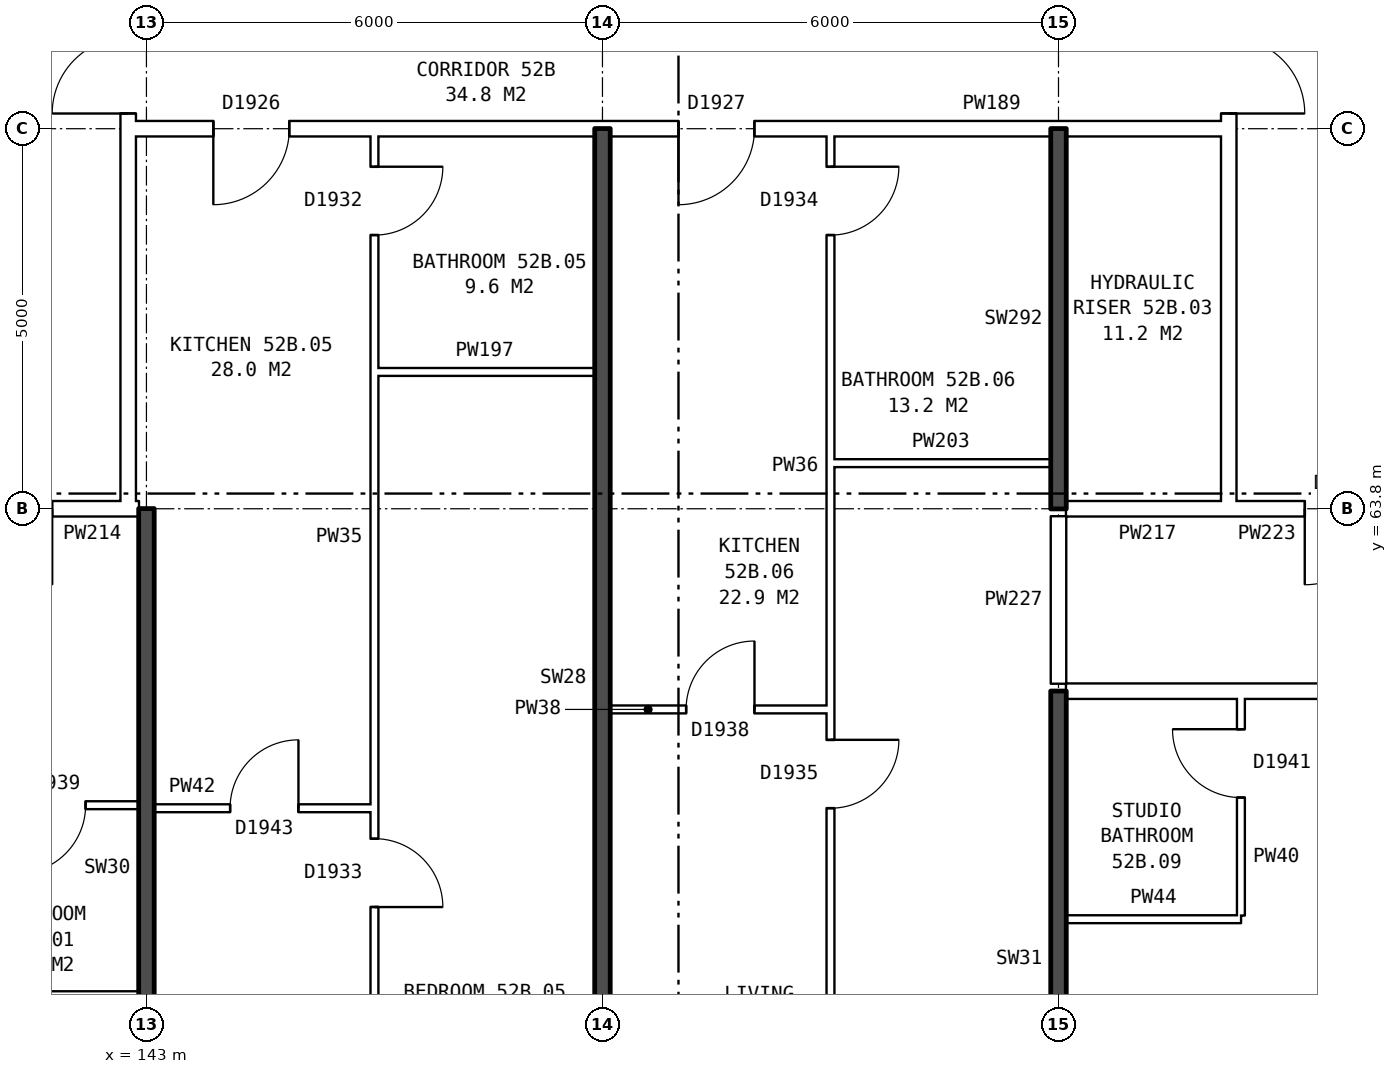
"""IFC4 building model, lengths in metres.
Left out: names, types, materials, properties, quantities, classifications, styles, units other than length and angle.
Written with IfcOpenShell. Run it as: python <this file> out.ifc"""

import sys

from ifc_helpers import new_model, si_unit, direction, frame, frame_2d, origin, place, context, subcontext, project, spatial, rectangle, extrude, element, fill, save


model = new_model("IFC4")
c1 = context("Model", 3, precision=1e-05, world=origin(), true_north=direction((0.0, 1.0)))
c2 = subcontext(c1, "Body", "Model", "MODEL_VIEW")
j1 = project(units=[si_unit("LENGTHUNIT", "METRE"), si_unit("PLANEANGLEUNIT", "RADIAN")], contexts=[c1])
p1 = place(None, origin())
s1 = spatial("IfcSite", under=j1, at=p1, CompositionType="ELEMENT")
p2 = place(p1, origin())
s2 = spatial("IfcBuilding", under=s1, at=p2, CompositionType="ELEMENT")
p3 = place(p2, frame((0.0, 0.0, 185.1)))
s3 = spatial("IfcBuildingStorey", under=s2, at=p3, CompositionType="ELEMENT", Elevation=185.1)
p4 = place(p3, frame((142.76, 63.9, 0.0), z_axis=(0.0, 0.0, 1.0), x_axis=(0.0, 1.0, 0.0)))
e1 = element("IfcWall", 1, at=p4, inside=s3, PredefinedType="PARTITIONING", context=c2, shape_type="SweptSolid", body=[
    extrude(rectangle(XDim=12.2, YDim=0.2, at=frame_2d((6.1, 0.0))), origin(), (0.0, 0.0, 1.0), 2.85),
])
p5 = place(p4, frame((5.1, 0.0, 0.0)))
e2 = element("IfcOpeningElement", 2, at=p5, cuts=e1, PredefinedType="OPENING", context=c2, shape_type="SweptSolid", body=[
    extrude(rectangle(XDim=2.0, YDim=2.1, at=frame_2d((1.0, 1.05))), frame((0.0, 0.11, 0.0), z_axis=(0.0, -1.0, 0.0), x_axis=(1.0, 0.0, 0.0)), (0.0, 0.0, 1.0), 0.22),
])
p6 = place(p3, frame((157.24, 63.9, 0.0), z_axis=(0.0, 0.0, 1.0), x_axis=(0.0, 1.0, 0.0)))
e3 = element("IfcWall", 3, at=p6, inside=s3, PredefinedType="PARTITIONING", context=c2, shape_type="SweptSolid", body=[
    extrude(rectangle(XDim=12.2, YDim=0.2, at=frame_2d((6.1, 0.0))), origin(), (0.0, 0.0, 1.0), 2.85),
])
p7 = place(p6, frame((5.1, 0.0, 0.0)))
e4 = element("IfcOpeningElement", 4, at=p7, cuts=e3, PredefinedType="OPENING", context=c2, shape_type="SweptSolid", body=[
    extrude(rectangle(XDim=2.0, YDim=2.1, at=frame_2d((1.0, 1.05))), frame((0.0, 0.11, 0.0), z_axis=(0.0, -1.0, 0.0), x_axis=(1.0, 0.0, 0.0)), (0.0, 0.0, 1.0), 0.22),
])
for number, where, z_axis, x_axis in (
    (5, (140.6, 57.4, 0.0), (0.0, 0.0, 1.0), (1.0, 0.0, 0.0)),
    (6, (155.1, 58.4, 0.0), (0.0, 0.0, 1.0), (1.0, 0.0, 0.0)),
):
    element("IfcWall", number, at=place(p3, frame(where, z_axis=z_axis, x_axis=x_axis)), inside=s3, PredefinedType="PARTITIONING", context=c2, shape_type="SweptSolid", body=[
        extrude(rectangle(XDim=2.3, YDim=0.1, at=frame_2d((1.15, 0.0))), origin(), (0.0, 0.0, 1.0), 2.85),
    ])
p8 = place(p3, frame((143.1, 59.86, 0.0), z_axis=(0.0, 0.0, 1.0), x_axis=(1.0, 0.0, 0.0)))
e7 = element("IfcWall", 7, at=p8, inside=s3, PredefinedType="PARTITIONING", context=c2, shape_type="SweptSolid", body=[
    extrude(rectangle(XDim=2.9, YDim=0.1, at=frame_2d((1.45, 0.0))), origin(), (0.0, 0.0, 1.0), 2.85),
])
p9 = place(p8, frame((1.0, 0.0, 0.0)))
e8 = element("IfcOpeningElement", 8, at=p9, cuts=e7, PredefinedType="OPENING", context=c2, shape_type="SweptSolid", body=[
    extrude(rectangle(XDim=0.9, YDim=2.1, at=frame_2d((0.45, 1.05))), frame((0.0, 0.06, 0.0), z_axis=(0.0, -1.0, 0.0), x_axis=(1.0, 0.0, 0.0)), (0.0, 0.0, 1.0), 0.12),
])
p10 = place(p3, frame((137.1, 59.9, 0.0), z_axis=(0.0, 0.0, 1.0), x_axis=(1.0, 0.0, 0.0)))
e9 = element("IfcWall", 9, at=p10, inside=s3, PredefinedType="PARTITIONING", context=c2, shape_type="SweptSolid", body=[
    extrude(rectangle(XDim=5.8, YDim=0.1, at=frame_2d((2.9, 0.0))), origin(), (0.0, 0.0, 1.0), 2.85),
])
p11 = place(p10, frame((1.3, 0.0, 0.0)))
e10 = element("IfcOpeningElement", 10, at=p11, cuts=e9, PredefinedType="OPENING", context=c2, shape_type="SweptSolid", body=[
    extrude(rectangle(XDim=0.9, YDim=2.1, at=frame_2d((0.45, 1.05))), frame((0.0, 0.06, 0.0), z_axis=(0.0, -1.0, 0.0), x_axis=(1.0, 0.0, 0.0)), (0.0, 0.0, 1.0), 0.12),
])
p12 = place(p10, frame((4.2, 0.0, 0.0)))
e11 = element("IfcOpeningElement", 11, at=p12, cuts=e9, PredefinedType="OPENING", context=c2, shape_type="SweptSolid", body=[
    extrude(rectangle(XDim=0.9, YDim=2.1, at=frame_2d((0.45, 1.05))), frame((0.0, 0.06, 0.0), z_axis=(0.0, -1.0, 0.0), x_axis=(1.0, 0.0, 0.0)), (0.0, 0.0, 1.0), 0.12),
])
p13 = place(p3, frame((149.1, 61.16, 0.0), z_axis=(0.0, 0.0, 1.0), x_axis=(1.0, 0.0, 0.0)))
e12 = element("IfcWall", 12, at=p13, inside=s3, PredefinedType="PARTITIONING", context=c2, shape_type="SweptSolid", body=[
    extrude(rectangle(XDim=2.9, YDim=0.1, at=frame_2d((1.45, 0.0))), origin(), (0.0, 0.0, 1.0), 2.85),
])
p14 = place(p13, frame((1.0, 0.0, 0.0)))
e13 = element("IfcOpeningElement", 13, at=p14, cuts=e12, PredefinedType="OPENING", context=c2, shape_type="SweptSolid", body=[
    extrude(rectangle(XDim=0.9, YDim=2.1, at=frame_2d((0.45, 1.05))), frame((0.0, 0.06, 0.0), z_axis=(0.0, -1.0, 0.0), x_axis=(1.0, 0.0, 0.0)), (0.0, 0.0, 1.0), 0.12),
])
p15 = place(p3, frame((155.1, 61.4, 0.0), z_axis=(0.0, 0.0, 1.0), x_axis=(1.0, 0.0, 0.0)))
e14 = element("IfcWall", 14, at=p15, inside=s3, PredefinedType="PARTITIONING", context=c2, shape_type="SweptSolid", body=[
    extrude(rectangle(XDim=14.79, YDim=0.2, at=frame_2d((7.395, 0.0))), origin(), (0.0, 0.0, 1.0), 2.85),
])
p16 = place(p15, frame((3.6, 0.0, 0.0)))
e15 = element("IfcOpeningElement", 15, at=p16, cuts=e14, PredefinedType="OPENING", context=c2, shape_type="SweptSolid", body=[
    extrude(rectangle(XDim=1.0, YDim=2.1, at=frame_2d((0.5, 1.05))), frame((0.0, 0.11, 0.0), z_axis=(0.0, -1.0, 0.0), x_axis=(1.0, 0.0, 0.0)), (0.0, 0.0, 1.0), 0.22),
])
p17 = place(p15, frame((11.045, 0.0, 0.0)))
e16 = element("IfcOpeningElement", 16, at=p17, cuts=e14, PredefinedType="OPENING", context=c2, shape_type="SweptSolid", body=[
    extrude(rectangle(XDim=1.0, YDim=2.1, at=frame_2d((0.5, 1.05))), frame((0.0, 0.11, 0.0), z_axis=(0.0, -1.0, 0.0), x_axis=(1.0, 0.0, 0.0)), (0.0, 0.0, 1.0), 0.22),
])
p18 = place(p3, frame((139.76, 63.8, 0.0), z_axis=(0.0, 0.0, 1.0), x_axis=(1.0, 0.0, 0.0)))
e17 = element("IfcWall", 17, at=p18, inside=s3, PredefinedType="PARTITIONING", context=c2, shape_type="SweptSolid", body=[
    extrude(rectangle(XDim=3.0, YDim=0.2, at=frame_2d((1.5, 0.0))), origin(), (0.0, 0.0, 1.0), 2.85),
])
p19 = place(p18, frame((1.0, 0.0, 0.0)))
e18 = element("IfcOpeningElement", 18, at=p19, cuts=e17, PredefinedType="OPENING", context=c2, shape_type="SweptSolid", body=[
    extrude(rectangle(XDim=1.0, YDim=2.1, at=frame_2d((0.5, 1.05))), frame((0.0, 0.11, 0.0), z_axis=(0.0, -1.0, 0.0), x_axis=(1.0, 0.0, 0.0)), (0.0, 0.0, 1.0), 0.22),
])
p20 = place(p3, frame((142.76, 63.8, 0.0), z_axis=(0.0, 0.0, 1.0), x_axis=(1.0, 0.0, 0.0)))
e19 = element("IfcWall", 19, at=p20, inside=s3, PredefinedType="PARTITIONING", context=c2, shape_type="SweptSolid", body=[
    extrude(rectangle(XDim=0.14, YDim=0.2, at=frame_2d((0.07, 0.0))), origin(), (0.0, 0.0, 1.0), 2.85),
])
p21 = place(p3, frame((155.1, 63.8, 0.0), z_axis=(0.0, 0.0, 1.0), x_axis=(1.0, 0.0, 0.0)))
e20 = element("IfcWall", 20, at=p21, inside=s3, PredefinedType="PARTITIONING", context=c2, shape_type="SweptSolid", body=[
    extrude(rectangle(XDim=2.14, YDim=0.2, at=frame_2d((1.07, 0.0))), origin(), (0.0, 0.0, 1.0), 2.85),
])
p22 = place(p3, frame((157.24, 63.8, 0.0), z_axis=(0.0, 0.0, 1.0), x_axis=(1.0, 0.0, 0.0)))
e21 = element("IfcWall", 21, at=p22, inside=s3, PredefinedType="PARTITIONING", context=c2, shape_type="SweptSolid", body=[
    extrude(rectangle(XDim=3.0, YDim=0.2, at=frame_2d((1.5, 0.0))), origin(), (0.0, 0.0, 1.0), 2.85),
])
p23 = place(p22, frame((1.0, 0.0, 0.0)))
e22 = element("IfcOpeningElement", 22, at=p23, cuts=e21, PredefinedType="OPENING", context=c2, shape_type="SweptSolid", body=[
    extrude(rectangle(XDim=1.0, YDim=2.1, at=frame_2d((0.5, 1.05))), frame((0.0, 0.11, 0.0), z_axis=(0.0, -1.0, 0.0), x_axis=(1.0, 0.0, 0.0)), (0.0, 0.0, 1.0), 0.22),
])
for number, where, z_axis, x_axis in (
    (23, (152.0, 64.4, 0.0), (0.0, 0.0, 1.0), (1.0, 0.0, 0.0)),
    (24, (146.0, 65.6, 0.0), (0.0, 0.0, 1.0), (1.0, 0.0, 0.0)),
):
    element("IfcWall", number, at=place(p3, frame(where, z_axis=z_axis, x_axis=x_axis)), inside=s3, PredefinedType="PARTITIONING", context=c2, shape_type="SweptSolid", body=[
        extrude(rectangle(XDim=2.9, YDim=0.1, at=frame_2d((1.45, 0.0))), origin(), (0.0, 0.0, 1.0), 2.85),
    ])
p24 = place(p3, frame((142.76, 68.8, 0.0), z_axis=(0.0, 0.0, 1.0), x_axis=(1.0, 0.0, 0.0)))
e25 = element("IfcWall", 25, at=p24, inside=s3, PredefinedType="PARTITIONING", context=c2, shape_type="SweptSolid", body=[
    extrude(rectangle(XDim=14.48, YDim=0.2, at=frame_2d((7.24, 0.0))), origin(), (0.0, 0.0, 1.0), 2.85),
])
p25 = place(p24, frame((1.12, 0.0, 0.0)))
e26 = element("IfcOpeningElement", 26, at=p25, cuts=e25, PredefinedType="OPENING", context=c2, shape_type="SweptSolid", body=[
    extrude(rectangle(XDim=1.0, YDim=2.1, at=frame_2d((0.5, 1.05))), frame((0.0, 0.11, 0.0), z_axis=(0.0, -1.0, 0.0), x_axis=(1.0, 0.0, 0.0)), (0.0, 0.0, 1.0), 0.22),
])
p26 = place(p24, frame((7.24, 0.0, 0.0)))
e27 = element("IfcOpeningElement", 27, at=p26, cuts=e25, PredefinedType="OPENING", context=c2, shape_type="SweptSolid", body=[
    extrude(rectangle(XDim=1.0, YDim=2.1, at=frame_2d((0.5, 1.05))), frame((0.0, 0.11, 0.0), z_axis=(0.0, -1.0, 0.0), x_axis=(1.0, 0.0, 0.0)), (0.0, 0.0, 1.0), 0.22),
])
p27 = place(p3, frame((143.0, 54.36, 0.0), z_axis=(0.0, 0.0, 1.0), x_axis=(0.0, 1.0, 0.0)))
e28 = element("IfcWall", 28, at=p27, inside=s3, PredefinedType="SOLIDWALL", context=c2, shape_type="SweptSolid", body=[
    extrude(rectangle(XDim=9.44, YDim=0.2, at=frame_2d((4.72, 0.0))), origin(), (0.0, 0.0, 1.0), 2.85),
])
p28 = place(p3, frame((146.0, 54.36, 0.0), z_axis=(0.0, 0.0, 1.0), x_axis=(0.0, 1.0, 0.0)))
e29 = element("IfcWall", 29, at=p28, inside=s3, PredefinedType="PARTITIONING", context=c2, shape_type="SweptSolid", body=[
    extrude(rectangle(XDim=14.34, YDim=0.1, at=frame_2d((7.17, 0.0))), origin(), (0.0, 0.0, 1.0), 2.85),
])
p29 = place(p28, frame((4.2, 0.0, 0.0)))
e30 = element("IfcOpeningElement", 30, at=p29, cuts=e29, PredefinedType="OPENING", context=c2, shape_type="SweptSolid", body=[
    extrude(rectangle(XDim=0.9, YDim=2.1, at=frame_2d((0.45, 1.05))), frame((0.0, 0.06, 0.0), z_axis=(0.0, -1.0, 0.0), x_axis=(1.0, 0.0, 0.0)), (0.0, 0.0, 1.0), 0.12),
])
p30 = place(p28, frame((13.04, 0.0, 0.0)))
e31 = element("IfcOpeningElement", 31, at=p30, cuts=e29, PredefinedType="OPENING", context=c2, shape_type="SweptSolid", body=[
    extrude(rectangle(XDim=0.9, YDim=2.1, at=frame_2d((0.45, 1.05))), frame((0.0, 0.06, 0.0), z_axis=(0.0, -1.0, 0.0), x_axis=(1.0, 0.0, 0.0)), (0.0, 0.0, 1.0), 0.12),
])
p31 = place(p3, frame((149.0, 54.36, 0.0), z_axis=(0.0, 0.0, 1.0), x_axis=(0.0, 1.0, 0.0)))
e32 = element("IfcWall", 32, at=p31, inside=s3, PredefinedType="SOLIDWALL", context=c2, shape_type="SweptSolid", body=[
    extrude(rectangle(XDim=14.44, YDim=0.2, at=frame_2d((7.22, 0.0))), origin(), (0.0, 0.0, 1.0), 2.85),
])
p32 = place(p3, frame((152.0, 54.36, 0.0), z_axis=(0.0, 0.0, 1.0), x_axis=(0.0, 1.0, 0.0)))
e33 = element("IfcWall", 33, at=p32, inside=s3, PredefinedType="PARTITIONING", context=c2, shape_type="SweptSolid", body=[
    extrude(rectangle(XDim=14.34, YDim=0.1, at=frame_2d((7.17, 0.0))), origin(), (0.0, 0.0, 1.0), 2.85),
])
p33 = place(p32, frame((5.5, 0.0, 0.0)))
e34 = element("IfcOpeningElement", 34, at=p33, cuts=e33, PredefinedType="OPENING", context=c2, shape_type="SweptSolid", body=[
    extrude(rectangle(XDim=0.9, YDim=2.1, at=frame_2d((0.45, 1.05))), frame((0.0, 0.06, 0.0), z_axis=(0.0, -1.0, 0.0), x_axis=(1.0, 0.0, 0.0)), (0.0, 0.0, 1.0), 0.12),
])
p34 = place(p32, frame((13.04, 0.0, 0.0)))
e35 = element("IfcOpeningElement", 35, at=p34, cuts=e33, PredefinedType="OPENING", context=c2, shape_type="SweptSolid", body=[
    extrude(rectangle(XDim=0.9, YDim=2.1, at=frame_2d((0.45, 1.05))), frame((0.0, 0.06, 0.0), z_axis=(0.0, -1.0, 0.0), x_axis=(1.0, 0.0, 0.0)), (0.0, 0.0, 1.0), 0.12),
])
p35 = place(p3, frame((155.0, 54.36, 0.0), z_axis=(0.0, 0.0, 1.0), x_axis=(0.0, 1.0, 0.0)))
e36 = element("IfcWall", 36, at=p35, inside=s3, PredefinedType="SOLIDWALL", context=c2, shape_type="SweptSolid", body=[
    extrude(rectangle(XDim=7.04, YDim=0.2, at=frame_2d((3.52, 0.0))), origin(), (0.0, 0.0, 1.0), 2.85),
])
p36 = place(p3, frame((155.0, 61.5, 0.0), z_axis=(0.0, 0.0, 1.0), x_axis=(0.0, 1.0, 0.0)))
e37 = element("IfcWall", 37, at=p36, inside=s3, PredefinedType="PARTITIONING", context=c2, shape_type="SweptSolid", body=[
    extrude(rectangle(XDim=2.2, YDim=0.2, at=frame_2d((1.1, 0.0))), origin(), (0.0, 0.0, 1.0), 2.85),
])
p37 = place(p3, frame((155.0, 63.8, 0.0), z_axis=(0.0, 0.0, 1.0), x_axis=(0.0, 1.0, 0.0)))
e38 = element("IfcWall", 38, at=p37, inside=s3, PredefinedType="SOLIDWALL", context=c2, shape_type="SweptSolid", body=[
    extrude(rectangle(XDim=5.0, YDim=0.2, at=frame_2d((2.5, 0.0))), origin(), (0.0, 0.0, 1.0), 2.85),
])
p38 = place(p3, frame((157.4, 58.45, 0.0), z_axis=(0.0, 0.0, 1.0), x_axis=(0.0, 1.0, 0.0)))
e39 = element("IfcWall", 39, at=p38, inside=s3, PredefinedType="PARTITIONING", context=c2, shape_type="SweptSolid", body=[
    extrude(rectangle(XDim=2.85, YDim=0.1, at=frame_2d((1.425, 0.0))), origin(), (0.0, 0.0, 1.0), 2.85),
])
p39 = place(p38, frame((1.55, 0.0, 0.0)))
e40 = element("IfcOpeningElement", 40, at=p39, cuts=e39, PredefinedType="OPENING", context=c2, shape_type="SweptSolid", body=[
    extrude(rectangle(XDim=0.9, YDim=2.1, at=frame_2d((0.45, 1.05))), frame((0.0, 0.06, 0.0), z_axis=(0.0, -1.0, 0.0), x_axis=(1.0, 0.0, 0.0)), (0.0, 0.0, 1.0), 0.12),
])
p40 = place(p5, origin())
e41 = element("IfcDoor", 41, at=p40, inside=s3, OperationType="DOUBLE_DOOR_SINGLE_SWING", PredefinedType="DOOR", context=c2, shape_type="SweptSolid", body=[
    extrude(rectangle(XDim=2.0, YDim=2.1, at=frame_2d((1.0, 1.05))), frame((0.0, 0.025, 0.0), z_axis=(0.0, -1.0, 0.0), x_axis=(1.0, 0.0, 0.0)), (0.0, 0.0, 1.0), 0.05),
])
fill(e2, e41)
p41 = place(p7, frame((2.0, 0.0, 0.0), z_axis=(0.0, 0.0, 1.0), x_axis=(-1.0, 0.0, 0.0)))
e42 = element("IfcDoor", 42, at=p41, inside=s3, OperationType="DOUBLE_DOOR_SINGLE_SWING", PredefinedType="DOOR", context=c2, shape_type="SweptSolid", body=[
    extrude(rectangle(XDim=2.0, YDim=2.1, at=frame_2d((1.0, 1.05))), frame((0.0, 0.025, 0.0), z_axis=(0.0, -1.0, 0.0), x_axis=(1.0, 0.0, 0.0)), (0.0, 0.0, 1.0), 0.05),
])
fill(e4, e42)
p42 = place(p23, frame((1.0, 0.0, 0.0), z_axis=(0.0, 0.0, 1.0), x_axis=(-1.0, 0.0, 0.0)))
e43 = element("IfcDoor", 43, at=p42, inside=s3, OperationType="SINGLE_SWING_RIGHT", PredefinedType="DOOR", context=c2, shape_type="SweptSolid", body=[
    extrude(rectangle(XDim=1.0, YDim=2.1, at=frame_2d((0.5, 1.05))), frame((0.0, 0.025, 0.0), z_axis=(0.0, -1.0, 0.0), x_axis=(1.0, 0.0, 0.0)), (0.0, 0.0, 1.0), 0.05),
])
fill(e22, e43)
p43 = place(p12, frame((0.9, 0.0, 0.0), z_axis=(0.0, 0.0, 1.0), x_axis=(-1.0, 0.0, 0.0)))
e44 = element("IfcDoor", 44, at=p43, inside=s3, OperationType="SINGLE_SWING_RIGHT", PredefinedType="DOOR", context=c2, shape_type="SweptSolid", body=[
    extrude(rectangle(XDim=0.9, YDim=2.1, at=frame_2d((0.45, 1.05))), frame((0.0, 0.025, 0.0), z_axis=(0.0, -1.0, 0.0), x_axis=(1.0, 0.0, 0.0)), (0.0, 0.0, 1.0), 0.05),
])
fill(e11, e44)
p44 = place(p29, frame((0.9, 0.0, 0.0), z_axis=(0.0, 0.0, 1.0), x_axis=(-1.0, 0.0, 0.0)))
e45 = element("IfcDoor", 45, at=p44, inside=s3, OperationType="SINGLE_SWING_RIGHT", PredefinedType="DOOR", context=c2, shape_type="SweptSolid", body=[
    extrude(rectangle(XDim=0.9, YDim=2.1, at=frame_2d((0.45, 1.05))), frame((0.0, 0.025, 0.0), z_axis=(0.0, -1.0, 0.0), x_axis=(1.0, 0.0, 0.0)), (0.0, 0.0, 1.0), 0.05),
])
fill(e30, e45)
p45 = place(p25, frame((1.0, 0.0, 0.0), z_axis=(0.0, 0.0, 1.0), x_axis=(-1.0, 0.0, 0.0)))
e46 = element("IfcDoor", 46, at=p45, inside=s3, OperationType="SINGLE_SWING_RIGHT", PredefinedType="DOOR", context=c2, shape_type="SweptSolid", body=[
    extrude(rectangle(XDim=1.0, YDim=2.1, at=frame_2d((0.5, 1.05))), frame((0.0, 0.025, 0.0), z_axis=(0.0, -1.0, 0.0), x_axis=(1.0, 0.0, 0.0)), (0.0, 0.0, 1.0), 0.05),
])
fill(e26, e46)
p46 = place(p9, origin())
e47 = element("IfcDoor", 47, at=p46, inside=s3, OperationType="SINGLE_SWING_RIGHT", PredefinedType="DOOR", context=c2, shape_type="SweptSolid", body=[
    extrude(rectangle(XDim=0.9, YDim=2.1, at=frame_2d((0.45, 1.05))), frame((0.0, 0.025, 0.0), z_axis=(0.0, -1.0, 0.0), x_axis=(1.0, 0.0, 0.0)), (0.0, 0.0, 1.0), 0.05),
])
fill(e8, e47)
p47 = place(p30, frame((0.9, 0.0, 0.0), z_axis=(0.0, 0.0, 1.0), x_axis=(-1.0, 0.0, 0.0)))
e48 = element("IfcDoor", 48, at=p47, inside=s3, OperationType="SINGLE_SWING_LEFT", PredefinedType="DOOR", context=c2, shape_type="SweptSolid", body=[
    extrude(rectangle(XDim=0.9, YDim=2.1, at=frame_2d((0.45, 1.05))), frame((0.0, 0.025, 0.0), z_axis=(0.0, -1.0, 0.0), x_axis=(1.0, 0.0, 0.0)), (0.0, 0.0, 1.0), 0.05),
])
fill(e31, e48)
p48 = place(p33, frame((0.9, 0.0, 0.0), z_axis=(0.0, 0.0, 1.0), x_axis=(-1.0, 0.0, 0.0)))
e49 = element("IfcDoor", 49, at=p48, inside=s3, OperationType="SINGLE_SWING_LEFT", PredefinedType="DOOR", context=c2, shape_type="SweptSolid", body=[
    extrude(rectangle(XDim=0.9, YDim=2.1, at=frame_2d((0.45, 1.05))), frame((0.0, 0.025, 0.0), z_axis=(0.0, -1.0, 0.0), x_axis=(1.0, 0.0, 0.0)), (0.0, 0.0, 1.0), 0.05),
])
fill(e34, e49)
p49 = place(p26, frame((1.0, 0.0, 0.0), z_axis=(0.0, 0.0, 1.0), x_axis=(-1.0, 0.0, 0.0)))
e50 = element("IfcDoor", 50, at=p49, inside=s3, OperationType="SINGLE_SWING_RIGHT", PredefinedType="DOOR", context=c2, shape_type="SweptSolid", body=[
    extrude(rectangle(XDim=1.0, YDim=2.1, at=frame_2d((0.5, 1.05))), frame((0.0, 0.025, 0.0), z_axis=(0.0, -1.0, 0.0), x_axis=(1.0, 0.0, 0.0)), (0.0, 0.0, 1.0), 0.05),
])
fill(e27, e50)
p50 = place(p14, origin())
e51 = element("IfcDoor", 51, at=p50, inside=s3, OperationType="SINGLE_SWING_RIGHT", PredefinedType="DOOR", context=c2, shape_type="SweptSolid", body=[
    extrude(rectangle(XDim=0.9, YDim=2.1, at=frame_2d((0.45, 1.05))), frame((0.0, 0.025, 0.0), z_axis=(0.0, -1.0, 0.0), x_axis=(1.0, 0.0, 0.0)), (0.0, 0.0, 1.0), 0.05),
])
fill(e13, e51)
p51 = place(p34, frame((0.9, 0.0, 0.0), z_axis=(0.0, 0.0, 1.0), x_axis=(-1.0, 0.0, 0.0)))
e52 = element("IfcDoor", 52, at=p51, inside=s3, OperationType="SINGLE_SWING_LEFT", PredefinedType="DOOR", context=c2, shape_type="SweptSolid", body=[
    extrude(rectangle(XDim=0.9, YDim=2.1, at=frame_2d((0.45, 1.05))), frame((0.0, 0.025, 0.0), z_axis=(0.0, -1.0, 0.0), x_axis=(1.0, 0.0, 0.0)), (0.0, 0.0, 1.0), 0.05),
])
fill(e35, e52)
p52 = place(p39, origin())
e53 = element("IfcDoor", 53, at=p52, inside=s3, OperationType="SINGLE_SWING_RIGHT", PredefinedType="DOOR", context=c2, shape_type="SweptSolid", body=[
    extrude(rectangle(XDim=0.9, YDim=2.1, at=frame_2d((0.45, 1.05))), frame((0.0, 0.025, 0.0), z_axis=(0.0, -1.0, 0.0), x_axis=(1.0, 0.0, 0.0)), (0.0, 0.0, 1.0), 0.05),
])
fill(e40, e53)
save(model, sys.argv[1])
